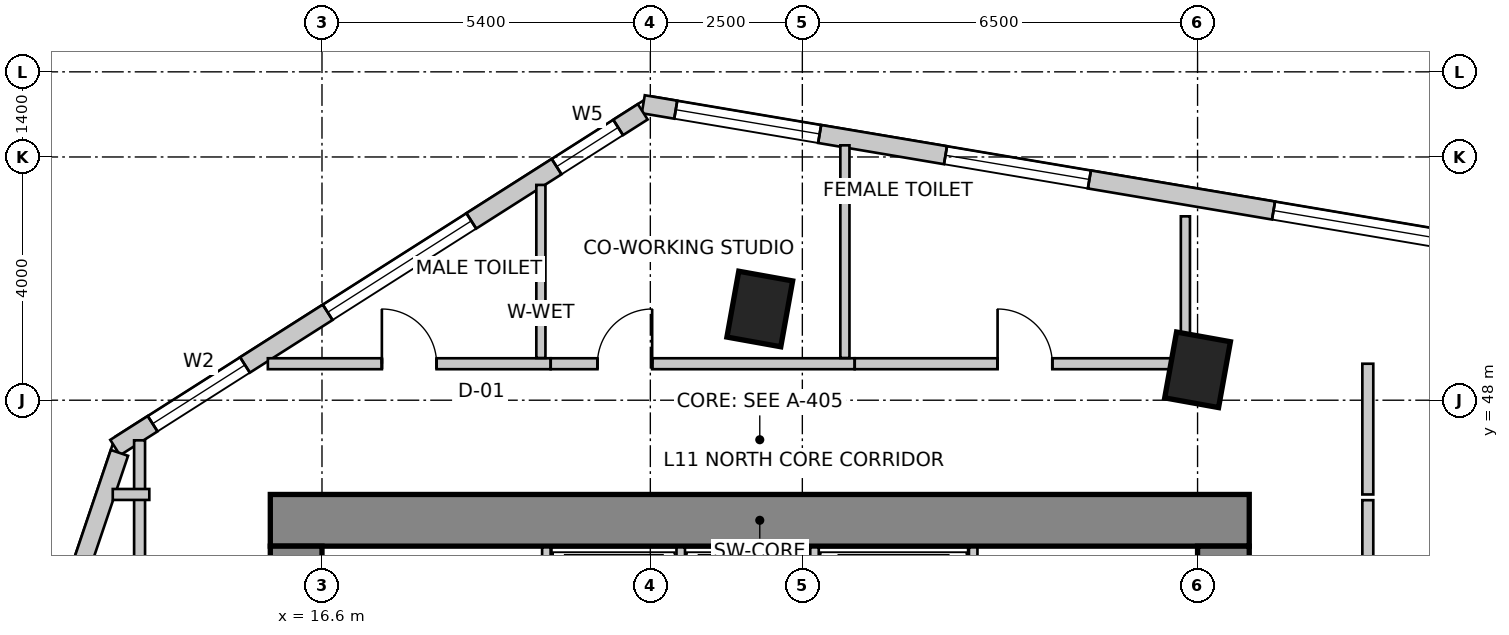
"""IFC4 building model, lengths in metres.
Left out: names, types, materials, properties, quantities, classifications, styles, units other than length and angle.
Written with IfcOpenShell. Run it as: python <this file> out.ifc"""

import sys

from ifc_helpers import new_model, si_unit, direction, frame, frame_2d, origin, origin_2d, place, context, subcontext, project, spatial, rectangle, extrude, source, transform, mapped, element, fill, save


model = new_model("IFC4")
c1 = context("Model", 3, precision=1e-05, world=origin(), true_north=direction((0.0, 1.0)))
c2 = subcontext(c1, "Body", "Model", "MODEL_VIEW")
j1 = project(units=[si_unit("LENGTHUNIT", "METRE"), si_unit("PLANEANGLEUNIT", "RADIAN")], contexts=[c1])
p1 = place(None, origin())
s1 = spatial("IfcSite", under=j1, at=p1, CompositionType="ELEMENT")
p2 = place(p1, origin())
s2 = spatial("IfcBuilding", under=s1, at=p2, CompositionType="ELEMENT")
p3 = place(p2, frame((0.0, 0.0, 47.0)))
s3 = spatial("IfcBuildingStorey", under=s2, at=p3, CompositionType="ELEMENT", Elevation=47.0)
p4 = place(p3, frame((15.75, 46.025, 0.0), z_axis=(0.0, 0.0, 1.0), x_axis=(1.0, 0.0, 0.0)))
e1 = element("IfcWall", 1, at=p4, inside=s3, PredefinedType="SHEAR", context=c2, shape_type="SweptSolid", body=[
    extrude(rectangle(XDim=16.1, YDim=0.85, at=frame_2d((8.05, 0.0))), origin(), (0.0, 0.0, 1.0), 4.0),
])
p5 = place(p3, frame((16.175, 34.2, 0.0), z_axis=(0.0, 0.0, 1.0), x_axis=(0.0, 1.0, 0.0)))
e2 = element("IfcWall", 2, at=p5, inside=s3, PredefinedType="SHEAR", context=c2, shape_type="SweptSolid", body=[
    extrude(rectangle(XDim=11.4, YDim=0.85, at=frame_2d((5.7, 0.0))), origin(), (0.0, 0.0, 1.0), 4.0),
])
m1 = source(origin(), c2, "Body", "SweptSolid", [
    extrude(rectangle(XDim=1.1, YDim=2.15, at=frame_2d((0.55, 1.075))), frame((0.0, 0.435, 0.0), z_axis=(0.0, -1.0, 0.0), x_axis=(1.0, 0.0, 0.0)), (0.0, 0.0, 1.0), 0.87),
])
p6 = place(p5, frame((7.15, 0.0, 0.0)))
e3 = element("IfcOpeningElement", 3, at=p6, cuts=e2, PredefinedType="OPENING", context=c2, shape_type="MappedRepresentation", body=[
    mapped(m1, transform((0.0, 0.0, 0.0), scale=1.0)),
])
p7 = place(p3, frame((31.425, 34.2, 0.0), z_axis=(0.0, 0.0, 1.0), x_axis=(0.0, 1.0, 0.0)))
e4 = element("IfcWall", 4, at=p7, inside=s3, PredefinedType="SHEAR", context=c2, shape_type="SweptSolid", body=[
    extrude(rectangle(XDim=11.4, YDim=0.85, at=frame_2d((5.7, 0.0))), origin(), (0.0, 0.0, 1.0), 4.0),
])
p8 = place(p7, frame((7.35, 0.0, 0.0)))
e5 = element("IfcOpeningElement", 5, at=p8, cuts=e4, PredefinedType="OPENING", context=c2, shape_type="MappedRepresentation", body=[
    mapped(m1, transform((0.0, 0.0, 0.0), scale=1.0)),
])
m2 = source(origin(), c2, "Body", "SweptSolid", [
    extrude(rectangle(XDim=0.9, YDim=1.1, at=origin_2d()), origin(), (0.0, 0.0, 1.0), 4.0),
])
for number, where, z_axis, x_axis in (
    (6, (23.8, 49.5, 0.0), (0.0, 0.0, 1.0), (0.984, -0.177, 0.0)),
    (7, (31.0, 48.5, 0.0), (0.0, 0.0, 1.0), (0.984, -0.177, 0.0)),
):
    element("IfcColumn", number, at=place(p3, frame(where, z_axis=z_axis, x_axis=x_axis)), inside=s3, PredefinedType="COLUMN", context=c2, shape_type="MappedRepresentation", body=[
        mapped(m2, transform((0.0, 0.0, 0.0), scale=1.0)),
    ])
p9 = place(p3, frame((58.761, 46.648, 0.0), z_axis=(0.0, 0.0, 1.0), x_axis=(-0.98607502735, 0.166301053624, 0.0)))
e8 = element("IfcWall", 8, at=p9, inside=s3, PredefinedType="SOLIDWALL", context=c2, shape_type="SweptSolid", body=[
    extrude(rectangle(XDim=37.397, YDim=0.3, at=frame_2d((18.699, 0.0))), origin(), (0.0, 0.0, 1.0), 3.75),
])
m3 = source(origin(), c2, "Body", "SweptSolid", [
    extrude(rectangle(XDim=2.1, YDim=2.0, at=frame_2d((1.05, 1.0))), frame((0.0, 0.16, 0.0), z_axis=(0.0, -1.0, 0.0), x_axis=(1.0, 0.0, 0.0)), (0.0, 0.0, 1.0), 0.32),
])
p10 = place(p9, frame((0.626, 0.0, 0.85)))
e9 = element("IfcOpeningElement", 9, at=p10, cuts=e8, PredefinedType="OPENING", context=c2, shape_type="MappedRepresentation", body=[
    mapped(m3, transform((0.0, 0.0, 0.0), scale=1.0)),
])
m4 = source(origin(), c2, "Body", "SweptSolid", [
    extrude(rectangle(XDim=2.4, YDim=2.2, at=frame_2d((1.2, 1.1))), frame((0.0, 0.16, 0.0), z_axis=(0.0, -1.0, 0.0), x_axis=(1.0, 0.0, 0.0)), (0.0, 0.0, 1.0), 0.32),
])
p11 = place(p9, frame((4.571, 0.0, 0.85)))
e10 = element("IfcOpeningElement", 10, at=p11, cuts=e8, PredefinedType="OPENING", context=c2, shape_type="MappedRepresentation", body=[
    mapped(m4, transform((0.0, 0.0, 0.0), scale=1.0)),
])
m5 = source(origin(), c2, "Body", "SweptSolid", [
    extrude(rectangle(XDim=2.8, YDim=2.4, at=frame_2d((1.4, 1.2))), frame((0.0, 0.16, 0.0), z_axis=(0.0, -1.0, 0.0), x_axis=(1.0, 0.0, 0.0)), (0.0, 0.0, 1.0), 0.32),
])
p12 = place(p9, frame((8.969, 0.0, 0.85)))
e11 = element("IfcOpeningElement", 11, at=p12, cuts=e8, PredefinedType="OPENING", context=c2, shape_type="MappedRepresentation", body=[
    mapped(m5, transform((0.0, 0.0, 0.0), scale=1.0)),
])
p13 = place(p9, frame((13.766, 0.0, 0.85)))
e12 = element("IfcOpeningElement", 12, at=p13, cuts=e8, PredefinedType="OPENING", context=c2, shape_type="MappedRepresentation", body=[
    mapped(m4, transform((0.0, 0.0, 0.0), scale=1.0)),
])
p14 = place(p9, frame((19.099, 0.0, 0.85)))
e13 = element("IfcOpeningElement", 13, at=p14, cuts=e8, PredefinedType="OPENING", context=c2, shape_type="MappedRepresentation", body=[
    mapped(m4, transform((0.0, 0.0, 0.0), scale=1.0)),
])
p15 = place(p9, frame((24.086, 0.0, 0.85)))
e14 = element("IfcOpeningElement", 14, at=p15, cuts=e8, PredefinedType="OPENING", context=c2, shape_type="MappedRepresentation", body=[
    mapped(m5, transform((0.0, 0.0, 0.0), scale=1.0)),
])
p16 = place(p9, frame((29.957, 0.0, 0.85)))
e15 = element("IfcOpeningElement", 15, at=p16, cuts=e8, PredefinedType="OPENING", context=c2, shape_type="MappedRepresentation", body=[
    mapped(m4, transform((0.0, 0.0, 0.0), scale=1.0)),
])
p17 = place(p9, frame((34.456, 0.0, 0.85)))
e16 = element("IfcOpeningElement", 16, at=p17, cuts=e8, PredefinedType="OPENING", context=c2, shape_type="MappedRepresentation", body=[
    mapped(m4, transform((0.0, 0.0, 0.0), scale=1.0)),
])
p18 = place(p3, frame((21.875, 52.743, 0.0), z_axis=(0.0, 0.0, 1.0), x_axis=(-0.843647802826, -0.536896996441, 0.0)))
e17 = element("IfcWall", 17, at=p18, inside=s3, PredefinedType="SOLIDWALL", context=c2, shape_type="SweptSolid", body=[
    extrude(rectangle(XDim=10.284, YDim=0.3, at=frame_2d((5.142, 0.0))), origin(), (0.0, 0.0, 1.0), 3.75),
])
m6 = source(origin(), c2, "Body", "SweptSolid", [
    extrude(rectangle(XDim=1.2, YDim=1.6, at=frame_2d((0.6, 0.8))), frame((0.0, 0.16, 0.0), z_axis=(0.0, -1.0, 0.0), x_axis=(1.0, 0.0, 0.0)), (0.0, 0.0, 1.0), 0.32),
])
p19 = place(p18, frame((0.479, 0.0, 0.85)))
e18 = element("IfcOpeningElement", 18, at=p19, cuts=e17, PredefinedType="OPENING", context=c2, shape_type="MappedRepresentation", body=[
    mapped(m6, transform((0.0, 0.0, 0.0), scale=1.0)),
])
p20 = place(p18, frame((3.342, 0.0, 0.85)))
e19 = element("IfcOpeningElement", 19, at=p20, cuts=e17, PredefinedType="OPENING", context=c2, shape_type="MappedRepresentation", body=[
    mapped(m5, transform((0.0, 0.0, 0.0), scale=1.0)),
])
m7 = source(origin(), c2, "Body", "SweptSolid", [
    extrude(rectangle(XDim=1.8, YDim=2.1, at=frame_2d((0.9, 1.05))), frame((0.0, 0.16, 0.0), z_axis=(0.0, -1.0, 0.0), x_axis=(1.0, 0.0, 0.0)), (0.0, 0.0, 1.0), 0.32),
])
p21 = place(p18, frame((7.754, 0.0, 0.85)))
e20 = element("IfcOpeningElement", 20, at=p21, cuts=e17, PredefinedType="OPENING", context=c2, shape_type="MappedRepresentation", body=[
    mapped(m7, transform((0.0, 0.0, 0.0), scale=1.0)),
])
p22 = place(p3, frame((13.269, 47.134, 0.0), z_axis=(0.0, 0.0, 1.0), x_axis=(-0.319920423265, -0.947444416722, 0.0)))
e21 = element("IfcWall", 21, at=p22, inside=s3, PredefinedType="SOLIDWALL", context=c2, shape_type="SweptSolid", body=[
    extrude(rectangle(XDim=16.135, YDim=0.3, at=frame_2d((8.067, 0.0))), origin(), (0.0, 0.0, 1.0), 3.75),
])
p23 = place(p22, frame((2.188, 0.0, 0.85)))
e22 = element("IfcOpeningElement", 22, at=p23, cuts=e21, PredefinedType="OPENING", context=c2, shape_type="MappedRepresentation", body=[
    mapped(m4, transform((0.0, 0.0, 0.0), scale=1.0)),
])
p24 = place(p22, frame((6.959, 0.0, 0.85)))
e23 = element("IfcOpeningElement", 23, at=p24, cuts=e21, PredefinedType="OPENING", context=c2, shape_type="MappedRepresentation", body=[
    mapped(m5, transform((0.0, 0.0, 0.0), scale=1.0)),
])
p25 = place(p22, frame((12.13, 0.0, 0.85)))
e24 = element("IfcOpeningElement", 24, at=p25, cuts=e21, PredefinedType="OPENING", context=c2, shape_type="MappedRepresentation", body=[
    mapped(m4, transform((0.0, 0.0, 0.0), scale=1.0)),
])
for number, where, z_axis, x_axis in (
    (25, (20.29, 43.28, 0.0), (0.0, 0.0, 1.0), (0.0, 1.0, 0.0)),
    (26, (27.31, 43.28, 0.0), (0.0, 0.0, 1.0), (0.0, 1.0, 0.0)),
):
    element("IfcWall", number, at=place(p3, frame(where, z_axis=z_axis, x_axis=x_axis)), inside=s3, PredefinedType="SOLIDWALL", context=c2, shape_type="SweptSolid", body=[
        extrude(rectangle(XDim=2.3, YDim=0.14, at=frame_2d((1.15, 0.0))), origin(), (0.0, 0.0, 1.0), 3.75),
    ])
for number, where, z_axis, x_axis in (
    (27, (22.5, 43.02, 0.0), (0.0, 0.0, 1.0), (0.0, 1.0, 0.0)),
    (28, (24.7, 43.02, 0.0), (0.0, 0.0, 1.0), (0.0, 1.0, 0.0)),
):
    element("IfcWall", number, at=place(p3, frame(where, z_axis=z_axis, x_axis=x_axis)), inside=s3, PredefinedType="SOLIDWALL", context=c2, shape_type="SweptSolid", body=[
        extrude(rectangle(XDim=2.56, YDim=0.14, at=frame_2d((1.28, 0.0))), origin(), (0.0, 0.0, 1.0), 3.75),
    ])
p26 = place(p3, frame((13.6, 33.444, 0.0), z_axis=(0.0, 0.0, 1.0), x_axis=(0.0, 1.0, 0.0)))
e29 = element("IfcWall", 29, at=p26, inside=s3, PredefinedType="PARTITIONING", context=c2, shape_type="SweptSolid", body=[
    extrude(rectangle(XDim=13.896, YDim=0.18, at=frame_2d((6.948, 0.0))), origin(), (0.0, 0.0, 1.0), 2.892),
])
m8 = source(origin(), c2, "Body", "SweptSolid", [
    extrude(rectangle(XDim=0.9, YDim=2.15, at=frame_2d((0.45, 1.075))), frame((0.0, 0.1, 0.0), z_axis=(0.0, -1.0, 0.0), x_axis=(1.0, 0.0, 0.0)), (0.0, 0.0, 1.0), 0.2),
])
p27 = place(p26, frame((4.144, 0.0, 0.0)))
e30 = element("IfcOpeningElement", 30, at=p27, cuts=e29, PredefinedType="OPENING", context=c2, shape_type="MappedRepresentation", body=[
    mapped(m8, transform((0.0, 0.0, 0.0), scale=1.0)),
])
p28 = place(p3, frame((13.76, 46.45, 0.0), z_axis=(0.0, 0.0, 1.0), x_axis=(-1.0, 0.0, 0.0)))
e31 = element("IfcWall", 31, at=p28, inside=s3, PredefinedType="PARTITIONING", context=c2, shape_type="SweptSolid", body=[
    extrude(rectangle(XDim=0.601, YDim=0.18, at=frame_2d((0.301, 0.0))), origin(), (0.0, 0.0, 1.0), 3.75),
])
p29 = place(p3, frame((15.71, 48.6, 0.0), z_axis=(0.0, 0.0, 1.0), x_axis=(1.0, 0.0, 0.0)))
e32 = element("IfcWall", 32, at=p29, inside=s3, PredefinedType="PARTITIONING", context=c2, shape_type="SweptSolid", body=[
    extrude(rectangle(XDim=4.65, YDim=0.18, at=frame_2d((2.325, 0.0))), origin(), (0.0, 0.0, 1.0), 3.75),
])
p30 = place(p29, frame((1.875, 0.0, 0.0)))
e33 = element("IfcOpeningElement", 33, at=p30, cuts=e32, PredefinedType="OPENING", context=c2, shape_type="MappedRepresentation", body=[
    mapped(m8, transform((0.0, 0.0, 0.0), scale=1.0)),
])
p31 = place(p3, frame((20.362, 48.6, 0.0), z_axis=(0.0, 0.0, 1.0), x_axis=(1.0, 0.0, 0.0)))
e34 = element("IfcWall", 34, at=p31, inside=s3, PredefinedType="PARTITIONING", context=c2, shape_type="SweptSolid", body=[
    extrude(rectangle(XDim=4.998, YDim=0.18, at=frame_2d((2.499, 0.0))), origin(), (0.0, 0.0, 1.0), 3.434),
])
p32 = place(p31, frame((0.768, 0.0, 0.0)))
e35 = element("IfcOpeningElement", 35, at=p32, cuts=e34, PredefinedType="OPENING", context=c2, shape_type="MappedRepresentation", body=[
    mapped(m8, transform((0.0, 0.0, 0.0), scale=1.0)),
])
p33 = place(p3, frame((25.362, 48.6, 0.0), z_axis=(0.0, 0.0, 1.0), x_axis=(1.0, 0.0, 0.0)))
e36 = element("IfcWall", 36, at=p33, inside=s3, PredefinedType="PARTITIONING", context=c2, shape_type="SweptSolid", body=[
    extrude(rectangle(XDim=5.598, YDim=0.18, at=frame_2d((2.799, 0.0))), origin(), (0.0, 0.0, 1.0), 2.892),
])
p34 = place(p33, frame((2.349, 0.0, 0.0)))
e37 = element("IfcOpeningElement", 37, at=p34, cuts=e36, PredefinedType="OPENING", context=c2, shape_type="MappedRepresentation", body=[
    mapped(m8, transform((0.0, 0.0, 0.0), scale=1.0)),
])
p35 = place(p3, frame((33.8, 48.6, 0.0), z_axis=(0.0, 0.0, 1.0), x_axis=(0.0, -1.0, 0.0)))
e38 = element("IfcWall", 38, at=p35, inside=s3, PredefinedType="PARTITIONING", context=c2, shape_type="SweptSolid", body=[
    extrude(rectangle(XDim=2.15, YDim=0.18, at=frame_2d((1.075, 0.0))), origin(), (0.0, 0.0, 1.0), 2.892),
])
p36 = place(p3, frame((33.8, 46.356, 0.0), z_axis=(0.0, 0.0, 1.0), x_axis=(0.0, -1.0, 0.0)))
e39 = element("IfcWall", 39, at=p36, inside=s3, PredefinedType="PARTITIONING", context=c2, shape_type="SweptSolid", body=[
    extrude(rectangle(XDim=3.716, YDim=0.18, at=frame_2d((1.858, 0.0))), origin(), (0.0, 0.0, 1.0), 3.322),
])
p37 = place(p3, frame((20.2, 51.54, 0.0), z_axis=(0.0, 0.0, 1.0), x_axis=(0.0, -1.0, 0.0)))
e40 = element("IfcWall", 40, at=p37, inside=s3, PredefinedType="PARTITIONING", context=c2, shape_type="SweptSolid", body=[
    extrude(rectangle(XDim=2.846, YDim=0.15, at=frame_2d((1.423, 0.0))), origin(), (0.0, 0.0, 1.0), 3.75),
])
p38 = place(p3, frame((25.2, 52.192, 0.0), z_axis=(0.0, 0.0, 1.0), x_axis=(0.0, -1.0, 0.0)))
e41 = element("IfcWall", 41, at=p38, inside=s3, PredefinedType="PARTITIONING", context=c2, shape_type="SweptSolid", body=[
    extrude(rectangle(XDim=3.498, YDim=0.15, at=frame_2d((1.749, 0.0))), origin(), (0.0, 0.0, 1.0), 2.892),
])
p39 = place(p3, frame((30.8, 51.024, 0.0), z_axis=(0.0, 0.0, 1.0), x_axis=(0.0, -1.0, 0.0)))
e42 = element("IfcWall", 42, at=p39, inside=s3, PredefinedType="PARTITIONING", context=c2, shape_type="SweptSolid", body=[
    extrude(rectangle(XDim=2.204, YDim=0.15, at=frame_2d((1.102, 0.0))), origin(), (0.0, 0.0, 1.0), 3.75),
])
m9 = source(origin(), c2, "Body", "SweptSolid", [
    extrude(rectangle(XDim=2.8, YDim=2.4, at=frame_2d((1.4, 1.2))), frame((0.0, -0.015, 0.0), z_axis=(0.0, -1.0, 0.0), x_axis=(1.0, 0.0, 0.0)), (0.0, 0.0, 1.0), 0.06),
])
p40 = place(p15, origin())
e43 = element("IfcWindow", 43, at=p40, inside=s3, PartitioningType="SINGLE_PANEL", PredefinedType="WINDOW", context=c2, shape_type="MappedRepresentation", body=[
    mapped(m9, transform((0.0, 0.0, 0.0), scale=1.0)),
])
fill(e14, e43)
m10 = source(origin(), c2, "Body", "SweptSolid", [
    extrude(rectangle(XDim=2.4, YDim=2.2, at=frame_2d((1.2, 1.1))), frame((0.0, -0.015, 0.0), z_axis=(0.0, -1.0, 0.0), x_axis=(1.0, 0.0, 0.0)), (0.0, 0.0, 1.0), 0.06),
])
p41 = place(p16, origin())
e44 = element("IfcWindow", 44, at=p41, inside=s3, PartitioningType="SINGLE_PANEL", PredefinedType="WINDOW", context=c2, shape_type="MappedRepresentation", body=[
    mapped(m10, transform((0.0, 0.0, 0.0), scale=1.0)),
])
fill(e15, e44)
p42 = place(p17, origin())
e45 = element("IfcWindow", 45, at=p42, inside=s3, PartitioningType="SINGLE_PANEL", PredefinedType="WINDOW", context=c2, shape_type="MappedRepresentation", body=[
    mapped(m10, transform((0.0, 0.0, 0.0), scale=1.0)),
])
fill(e16, e45)
m11 = source(origin(), c2, "Body", "SweptSolid", [
    extrude(rectangle(XDim=1.2, YDim=1.6, at=frame_2d((0.6, 0.8))), frame((0.0, -0.015, 0.0), z_axis=(0.0, -1.0, 0.0), x_axis=(1.0, 0.0, 0.0)), (0.0, 0.0, 1.0), 0.06),
])
p43 = place(p19, origin())
e46 = element("IfcWindow", 46, at=p43, inside=s3, PartitioningType="SINGLE_PANEL", PredefinedType="WINDOW", context=c2, shape_type="MappedRepresentation", body=[
    mapped(m11, transform((0.0, 0.0, 0.0), scale=1.0)),
])
fill(e18, e46)
p44 = place(p20, origin())
e47 = element("IfcWindow", 47, at=p44, inside=s3, PartitioningType="SINGLE_PANEL", PredefinedType="WINDOW", context=c2, shape_type="MappedRepresentation", body=[
    mapped(m9, transform((0.0, 0.0, 0.0), scale=1.0)),
])
fill(e19, e47)
m12 = source(origin(), c2, "Body", "SweptSolid", [
    extrude(rectangle(XDim=1.8, YDim=2.1, at=frame_2d((0.9, 1.05))), frame((0.0, -0.015, 0.0), z_axis=(0.0, -1.0, 0.0), x_axis=(1.0, 0.0, 0.0)), (0.0, 0.0, 1.0), 0.06),
])
p45 = place(p21, origin())
e48 = element("IfcWindow", 48, at=p45, inside=s3, PartitioningType="SINGLE_PANEL", PredefinedType="WINDOW", context=c2, shape_type="MappedRepresentation", body=[
    mapped(m12, transform((0.0, 0.0, 0.0), scale=1.0)),
])
fill(e20, e48)
m13 = source(origin(), c2, "Body", "SweptSolid", [
    extrude(rectangle(XDim=0.9, YDim=2.15, at=frame_2d((0.45, 1.075))), frame((0.0, 0.025, 0.0), z_axis=(0.0, -1.0, 0.0), x_axis=(1.0, 0.0, 0.0)), (0.0, 0.0, 1.0), 0.05),
])
p46 = place(p30, origin())
e49 = element("IfcDoor", 49, at=p46, inside=s3, OperationType="SINGLE_SWING_LEFT", PredefinedType="DOOR", context=c2, shape_type="MappedRepresentation", body=[
    mapped(m13, transform((0.0, 0.0, 0.0), scale=1.0)),
])
fill(e33, e49)
p47 = place(p32, origin())
e50 = element("IfcDoor", 50, at=p47, inside=s3, OperationType="SINGLE_SWING_RIGHT", PredefinedType="DOOR", context=c2, shape_type="MappedRepresentation", body=[
    mapped(m13, transform((0.0, 0.0, 0.0), scale=1.0)),
])
fill(e35, e50)
p48 = place(p34, origin())
e51 = element("IfcDoor", 51, at=p48, inside=s3, OperationType="SINGLE_SWING_LEFT", PredefinedType="DOOR", context=c2, shape_type="MappedRepresentation", body=[
    mapped(m13, transform((0.0, 0.0, 0.0), scale=1.0)),
])
fill(e37, e51)
save(model, sys.argv[1])
